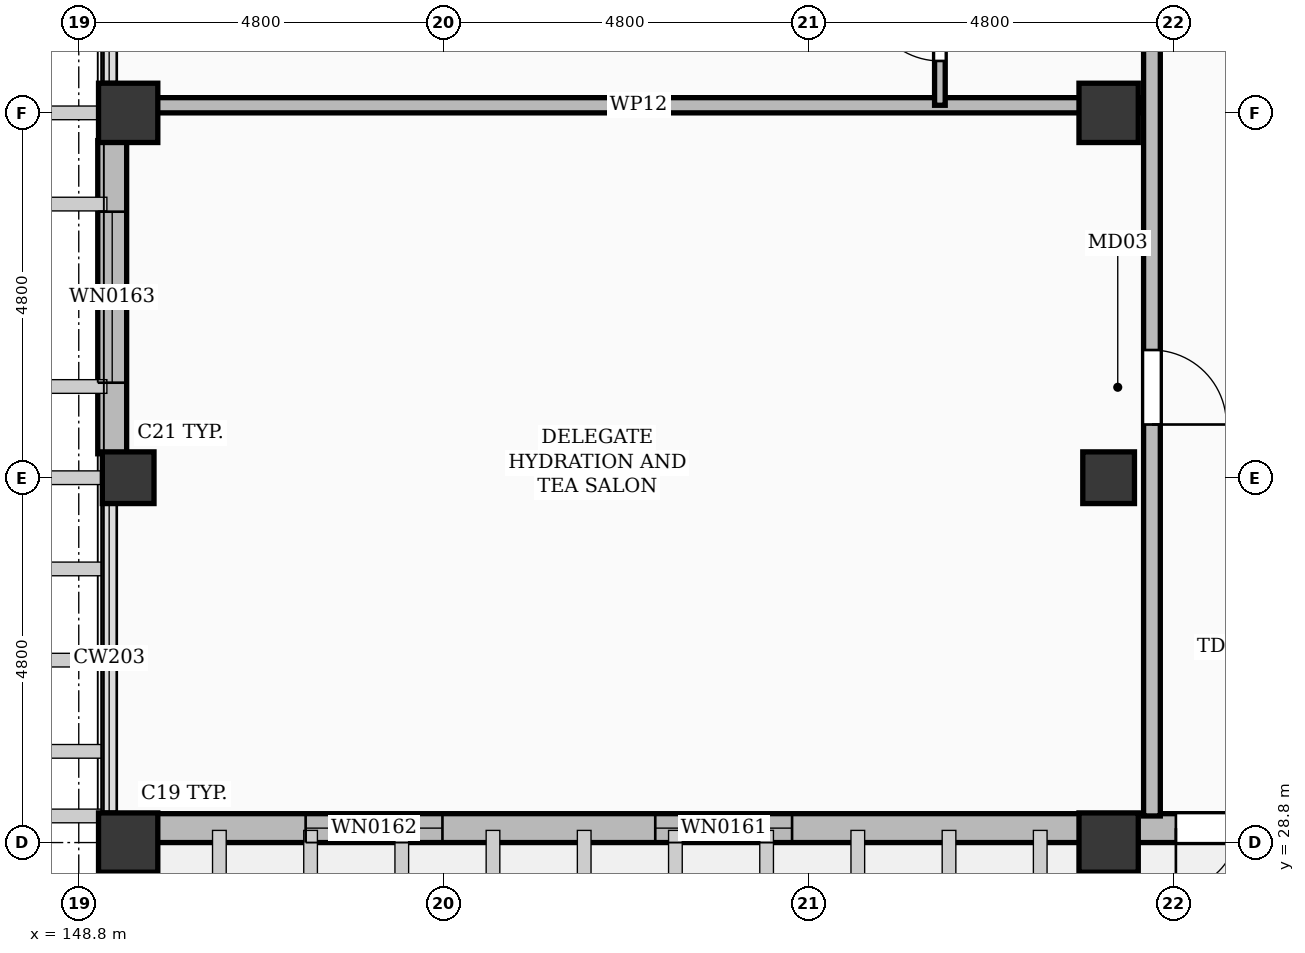
"""IFC4 building model, lengths in metres.
Left out: names, types, materials, properties, quantities, classifications, styles, units other than length and angle.
Written with IfcOpenShell. Run it as: python <this file> out.ifc"""

import sys

from ifc_helpers import new_model, si_unit, direction, frame, frame_2d, origin, origin_2d, place, context, subcontext, project, spatial, rectangle, extrude, element, fill, save


model = new_model("IFC4")
c1 = context("Model", 3, precision=1e-05, world=origin(), true_north=direction((0.0, 1.0)))
c2 = subcontext(c1, "Body", "Model", "MODEL_VIEW")
j1 = project(units=[si_unit("LENGTHUNIT", "METRE"), si_unit("PLANEANGLEUNIT", "RADIAN")], contexts=[c1])
p1 = place(None, origin())
s1 = spatial("IfcSite", under=j1, at=p1, CompositionType="ELEMENT")
p2 = place(p1, origin())
s2 = spatial("IfcBuilding", under=s1, at=p2, CompositionType="ELEMENT")
p3 = place(p2, frame((0.0, 0.0, 24.6)))
s3 = spatial("IfcBuildingStorey", under=s2, at=p3, CompositionType="ELEMENT", Elevation=24.6)
for number, where, z_axis, x_axis in (
    (1, (149.45, 28.8, 0.0), (0.0, 0.0, 1.0), (1.0, 0.0, 0.0)),
    (2, (149.45, 38.4, 0.0), (0.0, 0.0, 1.0), (1.0, 0.0, 0.0)),
    (3, (162.35, 28.8, 0.0), (0.0, 0.0, 1.0), (1.0, 0.0, 0.0)),
    (4, (162.35, 38.4, 0.0), (0.0, 0.0, 1.0), (1.0, 0.0, 0.0)),
):
    element("IfcColumn", number, at=place(p3, frame(where, z_axis=z_axis, x_axis=x_axis)), inside=s3, PredefinedType="COLUMN", context=c2, shape_type="SweptSolid", body=[
        extrude(rectangle(XDim=0.78, YDim=0.78, at=origin_2d()), origin(), (0.0, 0.0, 1.0), 3.6),
    ])
for number, where, z_axis, x_axis in (
    (5, (149.45, 33.6, 0.0), (0.0, 0.0, 1.0), (1.0, 0.0, 0.0)),
    (6, (162.35, 33.6, 0.0), (0.0, 0.0, 1.0), (1.0, 0.0, 0.0)),
):
    element("IfcColumn", number, at=place(p3, frame(where, z_axis=z_axis, x_axis=x_axis)), inside=s3, PredefinedType="COLUMN", context=c2, shape_type="SweptSolid", body=[
        extrude(rectangle(XDim=0.68, YDim=0.68, at=origin_2d()), origin(), (0.0, 0.0, 1.0), 3.6),
    ])
p4 = place(p3, frame((178.985, 28.99, 0.0), z_axis=(0.0, 0.0, 1.0), x_axis=(-1.0, 0.0, 0.0)))
e7 = element("IfcWall", 7, at=p4, inside=s3, PredefinedType="SOLIDWALL", context=c2, shape_type="SweptSolid", body=[
    extrude(rectangle(XDim=29.17, YDim=0.38, at=frame_2d((14.585, 0.0))), origin(), (0.0, 0.0, 1.0), 2.632),
])
p5 = place(p4, frame((14.15, 0.0, 0.0)))
e8 = element("IfcOpeningElement", 8, at=p5, cuts=e7, PredefinedType="OPENING", context=c2, shape_type="SweptSolid", body=[
    extrude(rectangle(XDim=1.6, YDim=2.25, at=frame_2d((0.8, 1.125))), frame((0.0, 0.202, 0.0), z_axis=(0.0, -1.0, 0.0), x_axis=(1.0, 0.0, 0.0)), (0.0, 0.0, 1.0), 0.404),
])
p6 = place(p4, frame((4.0, 0.0, 0.55)))
e9 = element("IfcOpeningElement", 9, at=p6, cuts=e7, PredefinedType="OPENING", context=c2, shape_type="SweptSolid", body=[
    extrude(rectangle(XDim=1.8, YDim=1.76, at=frame_2d((0.9, 0.88))), frame((0.0, 0.202, 0.0), z_axis=(0.0, -1.0, 0.0), x_axis=(1.0, 0.0, 0.0)), (0.0, 0.0, 1.0), 0.404),
])
p7 = place(p4, frame((9.6, 0.0, 0.55)))
e10 = element("IfcOpeningElement", 10, at=p7, cuts=e7, PredefinedType="OPENING", context=c2, shape_type="SweptSolid", body=[
    extrude(rectangle(XDim=1.8, YDim=1.76, at=frame_2d((0.9, 0.88))), frame((0.0, 0.202, 0.0), z_axis=(0.0, -1.0, 0.0), x_axis=(1.0, 0.0, 0.0)), (0.0, 0.0, 1.0), 0.404),
])
p8 = place(p4, frame((20.8, 0.0, 0.55)))
e11 = element("IfcOpeningElement", 11, at=p8, cuts=e7, PredefinedType="OPENING", context=c2, shape_type="SweptSolid", body=[
    extrude(rectangle(XDim=1.8, YDim=1.76, at=frame_2d((0.9, 0.88))), frame((0.0, 0.202, 0.0), z_axis=(0.0, -1.0, 0.0), x_axis=(1.0, 0.0, 0.0)), (0.0, 0.0, 1.0), 0.404),
])
p9 = place(p4, frame((25.4, 0.0, 0.55)))
e12 = element("IfcOpeningElement", 12, at=p9, cuts=e7, PredefinedType="OPENING", context=c2, shape_type="SweptSolid", body=[
    extrude(rectangle(XDim=1.8, YDim=1.76, at=frame_2d((0.9, 0.88))), frame((0.0, 0.202, 0.0), z_axis=(0.0, -1.0, 0.0), x_axis=(1.0, 0.0, 0.0)), (0.0, 0.0, 1.0), 0.404),
])
p10 = place(p3, frame((149.24, 33.915, 0.0), z_axis=(0.0, 0.0, 1.0), x_axis=(0.0, 1.0, 0.0)))
e13 = element("IfcWall", 13, at=p10, inside=s3, PredefinedType="SOLIDWALL", context=c2, shape_type="SweptSolid", body=[
    extrude(rectangle(XDim=4.12, YDim=0.38, at=frame_2d((2.06, 0.0))), origin(), (0.0, 0.0, 1.0), 2.632),
])
p11 = place(p10, frame((0.935, 0.0, 0.55)))
e14 = element("IfcOpeningElement", 14, at=p11, cuts=e13, PredefinedType="OPENING", context=c2, shape_type="SweptSolid", body=[
    extrude(rectangle(XDim=2.25, YDim=1.79, at=frame_2d((1.125, 0.895))), frame((0.0, 0.202, 0.0), z_axis=(0.0, -1.0, 0.0), x_axis=(1.0, 0.0, 0.0)), (0.0, 0.0, 1.0), 0.404),
])
p12 = place(p3, frame((162.92, 29.15, 0.0), z_axis=(0.0, 0.0, 1.0), x_axis=(0.0, 1.0, 0.0)))
e15 = element("IfcWall", 15, at=p12, inside=s3, PredefinedType="PARTITIONING", context=c2, shape_type="SweptSolid", body=[
    extrude(rectangle(XDim=44.05, YDim=0.22, at=frame_2d((22.025, 0.0))), origin(), (0.0, 0.0, 1.0), 2.632),
])
p13 = place(p12, frame((5.15, 0.0, 0.0)))
e16 = element("IfcOpeningElement", 16, at=p13, cuts=e15, PredefinedType="OPENING", context=c2, shape_type="SweptSolid", body=[
    extrude(rectangle(XDim=0.98, YDim=2.15, at=frame_2d((0.49, 1.075))), frame((0.0, 0.122, 0.0), z_axis=(0.0, -1.0, 0.0), x_axis=(1.0, 0.0, 0.0)), (0.0, 0.0, 1.0), 0.244),
])
p14 = place(p12, frame((12.188, 0.0, 0.0)))
e17 = element("IfcOpeningElement", 17, at=p14, cuts=e15, PredefinedType="OPENING", context=c2, shape_type="SweptSolid", body=[
    extrude(rectangle(XDim=1.08, YDim=2.25, at=frame_2d((0.54, 1.125))), frame((0.0, 0.122, 0.0), z_axis=(0.0, -1.0, 0.0), x_axis=(1.0, 0.0, 0.0)), (0.0, 0.0, 1.0), 0.244),
])
p15 = place(p12, frame((16.988, 0.0, 0.0)))
e18 = element("IfcOpeningElement", 18, at=p15, cuts=e15, PredefinedType="OPENING", context=c2, shape_type="SweptSolid", body=[
    extrude(rectangle(XDim=1.02, YDim=2.2, at=frame_2d((0.51, 1.1))), frame((0.0, 0.122, 0.0), z_axis=(0.0, -1.0, 0.0), x_axis=(1.0, 0.0, 0.0)), (0.0, 0.0, 1.0), 0.244),
])
p16 = place(p12, frame((21.438, 0.0, 0.0)))
e19 = element("IfcOpeningElement", 19, at=p16, cuts=e15, PredefinedType="OPENING", context=c2, shape_type="SweptSolid", body=[
    extrude(rectangle(XDim=1.5, YDim=2.3, at=frame_2d((0.75, 1.15))), frame((0.0, 0.122, 0.0), z_axis=(0.0, -1.0, 0.0), x_axis=(1.0, 0.0, 0.0)), (0.0, 0.0, 1.0), 0.244),
])
p17 = place(p12, frame((26.588, 0.0, 0.0)))
e20 = element("IfcOpeningElement", 20, at=p17, cuts=e15, PredefinedType="OPENING", context=c2, shape_type="SweptSolid", body=[
    extrude(rectangle(XDim=1.12, YDim=2.15, at=frame_2d((0.56, 1.075))), frame((0.0, 0.122, 0.0), z_axis=(0.0, -1.0, 0.0), x_axis=(1.0, 0.0, 0.0)), (0.0, 0.0, 1.0), 0.244),
])
p18 = place(p12, frame((31.388, 0.0, 0.0)))
e21 = element("IfcOpeningElement", 21, at=p18, cuts=e15, PredefinedType="OPENING", context=c2, shape_type="SweptSolid", body=[
    extrude(rectangle(XDim=1.28, YDim=2.16, at=frame_2d((0.64, 1.08))), frame((0.0, 0.122, 0.0), z_axis=(0.0, -1.0, 0.0), x_axis=(1.0, 0.0, 0.0)), (0.0, 0.0, 1.0), 0.244),
])
p19 = place(p12, frame((36.188, 0.0, 0.0)))
e22 = element("IfcOpeningElement", 22, at=p19, cuts=e15, PredefinedType="OPENING", context=c2, shape_type="SweptSolid", body=[
    extrude(rectangle(XDim=1.05, YDim=2.18, at=frame_2d((0.525, 1.09))), frame((0.0, 0.122, 0.0), z_axis=(0.0, -1.0, 0.0), x_axis=(1.0, 0.0, 0.0)), (0.0, 0.0, 1.0), 0.244),
])
p20 = place(p12, frame((40.988, 0.0, 0.0)))
e23 = element("IfcOpeningElement", 23, at=p20, cuts=e15, PredefinedType="OPENING", context=c2, shape_type="SweptSolid", body=[
    extrude(rectangle(XDim=1.08, YDim=2.25, at=frame_2d((0.54, 1.125))), frame((0.0, 0.122, 0.0), z_axis=(0.0, -1.0, 0.0), x_axis=(1.0, 0.0, 0.0)), (0.0, 0.0, 1.0), 0.244),
])
p21 = place(p3, frame((149.55, 38.5, 0.0), z_axis=(0.0, 0.0, 1.0), x_axis=(1.0, 0.0, 0.0)))
e24 = element("IfcWall", 24, at=p21, inside=s3, PredefinedType="PARTITIONING", context=c2, shape_type="SweptSolid", body=[
    extrude(rectangle(XDim=13.23, YDim=0.2, at=frame_2d((6.615, 0.0))), origin(), (0.0, 0.0, 1.0), 2.632),
])
p22 = place(p3, frame((160.13, 38.5, 0.0), z_axis=(0.0, 0.0, 1.0), x_axis=(0.0, 1.0, 0.0)))
e25 = element("IfcWall", 25, at=p22, inside=s3, PredefinedType="PARTITIONING", context=c2, shape_type="SweptSolid", body=[
    extrude(rectangle(XDim=2.116, YDim=0.14, at=frame_2d((1.058, 0.0))), origin(), (0.0, 0.0, 1.0), 2.632),
])
p23 = place(p22, frame((0.583, 0.0, 0.0)))
e26 = element("IfcOpeningElement", 26, at=p23, cuts=e25, PredefinedType="OPENING", context=c2, shape_type="SweptSolid", body=[
    extrude(rectangle(XDim=0.96, YDim=2.12, at=frame_2d((0.48, 1.06))), frame((0.0, 0.082, 0.0), z_axis=(0.0, -1.0, 0.0), x_axis=(1.0, 0.0, 0.0)), (0.0, 0.0, 1.0), 0.164),
])
p24 = place(p5, origin())
e27 = element("IfcDoor", 27, at=p24, inside=s3, OperationType="DOUBLE_DOOR_SINGLE_SWING", PredefinedType="DOOR", context=c2, shape_type="SweptSolid", body=[
    extrude(rectangle(XDim=1.6, YDim=2.25, at=frame_2d((0.8, 1.125))), frame((0.0, 0.025, 0.0), z_axis=(0.0, -1.0, 0.0), x_axis=(1.0, 0.0, 0.0)), (0.0, 0.0, 1.0), 0.05),
])
fill(e8, e27)
p25 = place(p8, origin())
e28 = element("IfcWindow", 28, at=p25, inside=s3, PartitioningType="SINGLE_PANEL", PredefinedType="WINDOW", context=c2, shape_type="SweptSolid", body=[
    extrude(rectangle(XDim=1.8, YDim=1.76, at=frame_2d((0.9, 0.88))), frame((0.0, 0.03, 0.0), z_axis=(0.0, -1.0, 0.0), x_axis=(1.0, 0.0, 0.0)), (0.0, 0.0, 1.0), 0.06),
])
fill(e11, e28)
p26 = place(p9, origin())
e29 = element("IfcWindow", 29, at=p26, inside=s3, PartitioningType="SINGLE_PANEL", PredefinedType="WINDOW", context=c2, shape_type="SweptSolid", body=[
    extrude(rectangle(XDim=1.8, YDim=1.76, at=frame_2d((0.9, 0.88))), frame((0.0, 0.03, 0.0), z_axis=(0.0, -1.0, 0.0), x_axis=(1.0, 0.0, 0.0)), (0.0, 0.0, 1.0), 0.06),
])
fill(e12, e29)
p27 = place(p11, origin())
e30 = element("IfcWindow", 30, at=p27, inside=s3, PartitioningType="SINGLE_PANEL", PredefinedType="WINDOW", context=c2, shape_type="SweptSolid", body=[
    extrude(rectangle(XDim=2.25, YDim=1.79, at=frame_2d((1.125, 0.895))), frame((0.0, 0.03, 0.0), z_axis=(0.0, -1.0, 0.0), x_axis=(1.0, 0.0, 0.0)), (0.0, 0.0, 1.0), 0.06),
])
fill(e14, e30)
p28 = place(p13, frame((0.98, 0.0, 0.0), z_axis=(0.0, 0.0, 1.0), x_axis=(-1.0, 0.0, 0.0)))
e31 = element("IfcDoor", 31, at=p28, inside=s3, OperationType="SINGLE_SWING_LEFT", PredefinedType="DOOR", context=c2, shape_type="SweptSolid", body=[
    extrude(rectangle(XDim=0.98, YDim=2.15, at=frame_2d((0.49, 1.075))), frame((0.0, 0.025, 0.0), z_axis=(0.0, -1.0, 0.0), x_axis=(1.0, 0.0, 0.0)), (0.0, 0.0, 1.0), 0.05),
])
fill(e16, e31)
p29 = place(p23, origin())
e32 = element("IfcDoor", 32, at=p29, inside=s3, OperationType="SINGLE_SWING_RIGHT", PredefinedType="DOOR", context=c2, shape_type="SweptSolid", body=[
    extrude(rectangle(XDim=0.96, YDim=2.12, at=frame_2d((0.48, 1.06))), frame((0.0, 0.025, 0.0), z_axis=(0.0, -1.0, 0.0), x_axis=(1.0, 0.0, 0.0)), (0.0, 0.0, 1.0), 0.05),
])
fill(e26, e32)
save(model, sys.argv[1])
